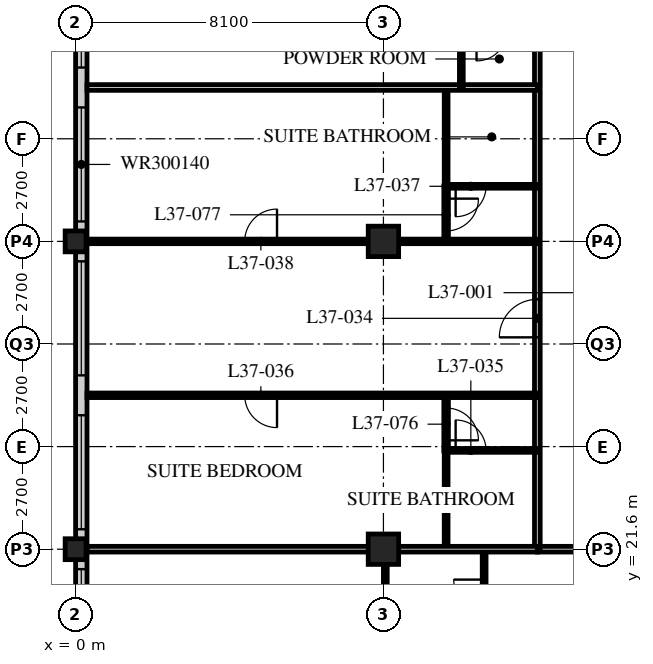
"""IFC4 building model, lengths in metres.
Left out: names, types, materials, properties, quantities, classifications, styles, units other than length and angle.
Written with IfcOpenShell. Run it as: python <this file> out.ifc"""

import sys

from ifc_helpers import new_model, si_unit, direction, frame, frame_2d, origin, origin_2d, place, context, subcontext, project, spatial, rectangle, hollow_rectangle, extrude, element, fill, save


model = new_model("IFC4")
c1 = context("Model", 3, precision=1e-05, world=origin(), true_north=direction((0.0, 1.0)))
c2 = subcontext(c1, "Body", "Model", "MODEL_VIEW")
j1 = project(units=[si_unit("LENGTHUNIT", "METRE"), si_unit("PLANEANGLEUNIT", "RADIAN")], contexts=[c1])
p1 = place(None, origin())
s1 = spatial("IfcSite", under=j1, at=p1, CompositionType="ELEMENT")
p2 = place(p1, origin())
s2 = spatial("IfcBuilding", under=s1, at=p2, CompositionType="ELEMENT")
p3 = place(p2, frame((0.0, 0.0, 144.2)))
s3 = spatial("IfcBuildingStorey", under=s2, at=p3, CompositionType="ELEMENT", Elevation=144.2)
for number, where, z_axis, x_axis in (
    (1, (0.0, 21.6, 0.0), (0.0, 0.0, 1.0), (1.0, 0.0, 0.0)),
    (2, (0.0, 29.7, 0.0), (0.0, 0.0, 1.0), (1.0, 0.0, 0.0)),
):
    element("IfcColumn", number, at=place(p3, frame(where, z_axis=z_axis, x_axis=x_axis)), inside=s3, PredefinedType="COLUMN", context=c2, shape_type="SweptSolid", body=[
        extrude(hollow_rectangle(XDim=0.55, YDim=0.55, WallThickness=0.04, at=origin_2d()), origin(), (0.0, 0.0, 1.0), 3.4),
    ])
for number, where, z_axis, x_axis in (
    (3, (8.1, 21.6, 0.0), (0.0, 0.0, 1.0), (1.0, 0.0, 0.0)),
    (4, (8.1, 29.7, 0.0), (0.0, 0.0, 1.0), (1.0, 0.0, 0.0)),
):
    element("IfcColumn", number, at=place(p3, frame(where, z_axis=z_axis, x_axis=x_axis)), inside=s3, PredefinedType="COLUMN", context=c2, shape_type="SweptSolid", body=[
        extrude(hollow_rectangle(XDim=0.8, YDim=0.8, WallThickness=0.08, at=origin_2d()), origin(), (0.0, 0.0, 1.0), 3.4),
    ])
p4 = place(p3, frame((0.15, 45.6, 0.0), z_axis=(0.0, 0.0, 1.0), x_axis=(0.0, -1.0, 0.0)))
e5 = element("IfcWall", 5, at=p4, inside=s3, PredefinedType="SOLIDWALL", context=c2, shape_type="SweptSolid", body=[
    extrude(rectangle(XDim=32.1, YDim=0.3, at=frame_2d((16.05, 0.0))), origin(), (0.0, 0.0, 1.0), 3.19),
])
p5 = place(p4, frame((0.225, 0.0, 0.9)))
e6 = element("IfcOpeningElement", 6, at=p5, cuts=e5, PredefinedType="OPENING", context=c2, shape_type="SweptSolid", body=[
    extrude(rectangle(XDim=3.0, YDim=1.4, at=frame_2d((1.5, 0.7))), frame((0.0, 0.16, 0.0), z_axis=(0.0, -1.0, 0.0), x_axis=(1.0, 0.0, 0.0)), (0.0, 0.0, 1.0), 0.32),
])
p6 = place(p4, frame((4.275, 0.0, 0.9)))
e7 = element("IfcOpeningElement", 7, at=p6, cuts=e5, PredefinedType="OPENING", context=c2, shape_type="SweptSolid", body=[
    extrude(rectangle(XDim=3.0, YDim=1.4, at=frame_2d((1.5, 0.7))), frame((0.0, 0.16, 0.0), z_axis=(0.0, -1.0, 0.0), x_axis=(1.0, 0.0, 0.0)), (0.0, 0.0, 1.0), 0.32),
])
p7 = place(p4, frame((8.325, 0.0, 0.9)))
e8 = element("IfcOpeningElement", 8, at=p7, cuts=e5, PredefinedType="OPENING", context=c2, shape_type="SweptSolid", body=[
    extrude(rectangle(XDim=3.0, YDim=1.4, at=frame_2d((1.5, 0.7))), frame((0.0, 0.16, 0.0), z_axis=(0.0, -1.0, 0.0), x_axis=(1.0, 0.0, 0.0)), (0.0, 0.0, 1.0), 0.32),
])
p8 = place(p4, frame((12.375, 0.0, 0.9)))
e9 = element("IfcOpeningElement", 9, at=p8, cuts=e5, PredefinedType="OPENING", context=c2, shape_type="SweptSolid", body=[
    extrude(rectangle(XDim=3.0, YDim=1.4, at=frame_2d((1.5, 0.7))), frame((0.0, 0.16, 0.0), z_axis=(0.0, -1.0, 0.0), x_axis=(1.0, 0.0, 0.0)), (0.0, 0.0, 1.0), 0.32),
])
p9 = place(p4, frame((16.425, 0.0, 0.9)))
e10 = element("IfcOpeningElement", 10, at=p9, cuts=e5, PredefinedType="OPENING", context=c2, shape_type="SweptSolid", body=[
    extrude(rectangle(XDim=3.0, YDim=1.4, at=frame_2d((1.5, 0.7))), frame((0.0, 0.16, 0.0), z_axis=(0.0, -1.0, 0.0), x_axis=(1.0, 0.0, 0.0)), (0.0, 0.0, 1.0), 0.32),
])
p10 = place(p4, frame((20.475, 0.0, 0.9)))
e11 = element("IfcOpeningElement", 11, at=p10, cuts=e5, PredefinedType="OPENING", context=c2, shape_type="SweptSolid", body=[
    extrude(rectangle(XDim=3.0, YDim=1.4, at=frame_2d((1.5, 0.7))), frame((0.0, 0.16, 0.0), z_axis=(0.0, -1.0, 0.0), x_axis=(1.0, 0.0, 0.0)), (0.0, 0.0, 1.0), 0.32),
])
p11 = place(p4, frame((24.525, 0.0, 0.9)))
e12 = element("IfcOpeningElement", 12, at=p11, cuts=e5, PredefinedType="OPENING", context=c2, shape_type="SweptSolid", body=[
    extrude(rectangle(XDim=3.0, YDim=1.4, at=frame_2d((1.5, 0.7))), frame((0.0, 0.16, 0.0), z_axis=(0.0, -1.0, 0.0), x_axis=(1.0, 0.0, 0.0)), (0.0, 0.0, 1.0), 0.32),
])
p12 = place(p4, frame((28.575, 0.0, 0.9)))
e13 = element("IfcOpeningElement", 13, at=p12, cuts=e5, PredefinedType="OPENING", context=c2, shape_type="SweptSolid", body=[
    extrude(rectangle(XDim=3.0, YDim=1.4, at=frame_2d((1.5, 0.7))), frame((0.0, 0.16, 0.0), z_axis=(0.0, -1.0, 0.0), x_axis=(1.0, 0.0, 0.0)), (0.0, 0.0, 1.0), 0.32),
])
p13 = place(p3, frame((12.15, 21.6, 0.0), z_axis=(0.0, 0.0, 1.0), x_axis=(1.0, 0.0, 0.0)))
e14 = element("IfcWall", 14, at=p13, inside=s3, PredefinedType="PARTITIONING", context=c2, shape_type="SweptSolid", body=[
    extrude(rectangle(XDim=36.45, YDim=0.15, at=frame_2d((18.225, 0.0))), origin(), (0.0, 0.0, 1.0), 2.42),
])
p14 = place(p13, frame((5.95, 0.0, 0.0)))
e15 = element("IfcOpeningElement", 15, at=p14, cuts=e14, PredefinedType="OPENING", context=c2, shape_type="SweptSolid", body=[
    extrude(rectangle(XDim=1.0, YDim=2.1, at=frame_2d((0.5, 1.05))), frame((0.0, 0.085, 0.0), z_axis=(0.0, -1.0, 0.0), x_axis=(1.0, 0.0, 0.0)), (0.0, 0.0, 1.0), 0.17),
])
p15 = place(p13, frame((14.05, 0.0, 0.0)))
e16 = element("IfcOpeningElement", 16, at=p15, cuts=e14, PredefinedType="OPENING", context=c2, shape_type="SweptSolid", body=[
    extrude(rectangle(XDim=1.0, YDim=2.1, at=frame_2d((0.5, 1.05))), frame((0.0, 0.085, 0.0), z_axis=(0.0, -1.0, 0.0), x_axis=(1.0, 0.0, 0.0)), (0.0, 0.0, 1.0), 0.17),
])
p16 = place(p13, frame((22.15, 0.0, 0.0)))
e17 = element("IfcOpeningElement", 17, at=p16, cuts=e14, PredefinedType="OPENING", context=c2, shape_type="SweptSolid", body=[
    extrude(rectangle(XDim=1.0, YDim=2.1, at=frame_2d((0.5, 1.05))), frame((0.0, 0.085, 0.0), z_axis=(0.0, -1.0, 0.0), x_axis=(1.0, 0.0, 0.0)), (0.0, 0.0, 1.0), 0.17),
])
p17 = place(p13, frame((30.8, 0.0, 0.0)))
e18 = element("IfcOpeningElement", 18, at=p17, cuts=e14, PredefinedType="OPENING", context=c2, shape_type="SweptSolid", body=[
    extrude(rectangle(XDim=1.0, YDim=2.1, at=frame_2d((0.5, 1.05))), frame((0.0, 0.085, 0.0), z_axis=(0.0, -1.0, 0.0), x_axis=(1.0, 0.0, 0.0)), (0.0, 0.0, 1.0), 0.17),
])
p18 = place(p13, frame((1.525, 0.0, 0.0)))
e19 = element("IfcOpeningElement", 19, at=p18, cuts=e14, PredefinedType="OPENING", context=c2, shape_type="SweptSolid", body=[
    extrude(rectangle(XDim=1.0, YDim=2.1, at=frame_2d((0.5, 1.05))), frame((0.0, 0.085, 0.0), z_axis=(0.0, -1.0, 0.0), x_axis=(1.0, 0.0, 0.0)), (0.0, 0.0, 1.0), 0.17),
])
p19 = place(p13, frame((33.925, 0.0, 0.0)))
e20 = element("IfcOpeningElement", 20, at=p19, cuts=e14, PredefinedType="OPENING", context=c2, shape_type="SweptSolid", body=[
    extrude(rectangle(XDim=1.0, YDim=2.1, at=frame_2d((0.5, 1.05))), frame((0.0, 0.085, 0.0), z_axis=(0.0, -1.0, 0.0), x_axis=(1.0, 0.0, 0.0)), (0.0, 0.0, 1.0), 0.17),
])
p20 = place(p3, frame((12.15, 21.6, 0.0), z_axis=(0.0, 0.0, 1.0), x_axis=(0.0, 1.0, 0.0)))
e21 = element("IfcWall", 21, at=p20, inside=s3, PredefinedType="PARTITIONING", context=c2, shape_type="SweptSolid", body=[
    extrude(rectangle(XDim=24.3, YDim=0.15, at=frame_2d((12.15, 0.0))), origin(), (0.0, 0.0, 1.0), 3.19),
])
p21 = place(p20, frame((5.575, 0.0, 0.0)))
e22 = element("IfcOpeningElement", 22, at=p21, cuts=e21, PredefinedType="OPENING", context=c2, shape_type="SweptSolid", body=[
    extrude(rectangle(XDim=1.0, YDim=2.1, at=frame_2d((0.5, 1.05))), frame((0.0, 0.085, 0.0), z_axis=(0.0, -1.0, 0.0), x_axis=(1.0, 0.0, 0.0)), (0.0, 0.0, 1.0), 0.17),
])
p22 = place(p20, frame((14.05, 0.0, 0.0)))
e23 = element("IfcOpeningElement", 23, at=p22, cuts=e21, PredefinedType="OPENING", context=c2, shape_type="SweptSolid", body=[
    extrude(rectangle(XDim=1.0, YDim=2.1, at=frame_2d((0.5, 1.05))), frame((0.0, 0.085, 0.0), z_axis=(0.0, -1.0, 0.0), x_axis=(1.0, 0.0, 0.0)), (0.0, 0.0, 1.0), 0.17),
])
p23 = place(p20, frame((22.7, 0.0, 0.0)))
e24 = element("IfcOpeningElement", 24, at=p23, cuts=e21, PredefinedType="OPENING", context=c2, shape_type="SweptSolid", body=[
    extrude(rectangle(XDim=1.0, YDim=2.1, at=frame_2d((0.5, 1.05))), frame((0.0, 0.085, 0.0), z_axis=(0.0, -1.0, 0.0), x_axis=(1.0, 0.0, 0.0)), (0.0, 0.0, 1.0), 0.17),
])
p24 = place(p3, frame((9.75, 21.6, 0.0), z_axis=(0.0, 0.0, 1.0), x_axis=(0.0, 1.0, 0.0)))
e25 = element("IfcWall", 25, at=p24, inside=s3, PredefinedType="PARTITIONING", context=c2, shape_type="SweptSolid", body=[
    extrude(rectangle(XDim=2.6, YDim=0.1, at=frame_2d((1.3, 0.0))), origin(), (0.0, 0.0, 1.0), 3.19),
])
p25 = place(p3, frame((12.15, 24.2, 0.0), z_axis=(0.0, 0.0, 1.0), x_axis=(-1.0, 0.0, 0.0)))
e26 = element("IfcWall", 26, at=p25, inside=s3, PredefinedType="PARTITIONING", context=c2, shape_type="SweptSolid", body=[
    extrude(rectangle(XDim=2.4, YDim=0.1, at=frame_2d((1.2, 0.0))), origin(), (0.0, 0.0, 1.0), 3.19),
])
p26 = place(p25, frame((1.35, 0.0, 0.0)))
e27 = element("IfcOpeningElement", 27, at=p26, cuts=e26, PredefinedType="OPENING", context=c2, shape_type="SweptSolid", body=[
    extrude(rectangle(XDim=0.8, YDim=2.1, at=frame_2d((0.4, 1.05))), frame((0.0, 0.06, 0.0), z_axis=(0.0, -1.0, 0.0), x_axis=(1.0, 0.0, 0.0)), (0.0, 0.0, 1.0), 0.12),
])
p27 = place(p3, frame((12.15, 25.65, 0.0), z_axis=(0.0, 0.0, 1.0), x_axis=(-1.0, 0.0, 0.0)))
e28 = element("IfcWall", 28, at=p27, inside=s3, PredefinedType="PARTITIONING", context=c2, shape_type="SweptSolid", body=[
    extrude(rectangle(XDim=11.85, YDim=0.12, at=frame_2d((5.925, 0.0))), origin(), (0.0, 0.0, 1.0), 3.19),
])
p28 = place(p27, frame((6.85, 0.0, 0.0)))
e29 = element("IfcOpeningElement", 29, at=p28, cuts=e28, PredefinedType="OPENING", context=c2, shape_type="SweptSolid", body=[
    extrude(rectangle(XDim=0.85, YDim=2.1, at=frame_2d((0.425, 1.05))), frame((0.0, 0.07, 0.0), z_axis=(0.0, -1.0, 0.0), x_axis=(1.0, 0.0, 0.0)), (0.0, 0.0, 1.0), 0.14),
])
p29 = place(p3, frame((9.75, 31.15, 0.0), z_axis=(0.0, 0.0, 1.0), x_axis=(0.0, 1.0, 0.0)))
e30 = element("IfcWall", 30, at=p29, inside=s3, PredefinedType="PARTITIONING", context=c2, shape_type="SweptSolid", body=[
    extrude(rectangle(XDim=2.6, YDim=0.1, at=frame_2d((1.3, 0.0))), origin(), (0.0, 0.0, 1.0), 3.19),
])
p30 = place(p3, frame((12.15, 31.15, 0.0), z_axis=(0.0, 0.0, 1.0), x_axis=(-1.0, 0.0, 0.0)))
e31 = element("IfcWall", 31, at=p30, inside=s3, PredefinedType="PARTITIONING", context=c2, shape_type="SweptSolid", body=[
    extrude(rectangle(XDim=2.4, YDim=0.1, at=frame_2d((1.2, 0.0))), origin(), (0.0, 0.0, 1.0), 3.19),
])
p31 = place(p30, frame((1.35, 0.0, 0.0)))
e32 = element("IfcOpeningElement", 32, at=p31, cuts=e31, PredefinedType="OPENING", context=c2, shape_type="SweptSolid", body=[
    extrude(rectangle(XDim=0.8, YDim=2.1, at=frame_2d((0.4, 1.05))), frame((0.0, 0.06, 0.0), z_axis=(0.0, -1.0, 0.0), x_axis=(1.0, 0.0, 0.0)), (0.0, 0.0, 1.0), 0.12),
])
p32 = place(p3, frame((12.15, 29.7, 0.0), z_axis=(0.0, 0.0, 1.0), x_axis=(-1.0, 0.0, 0.0)))
e33 = element("IfcWall", 33, at=p32, inside=s3, PredefinedType="PARTITIONING", context=c2, shape_type="SweptSolid", body=[
    extrude(rectangle(XDim=11.85, YDim=0.12, at=frame_2d((5.925, 0.0))), origin(), (0.0, 0.0, 1.0), 2.42),
])
p33 = place(p32, frame((6.85, 0.0, 0.0)))
e34 = element("IfcOpeningElement", 34, at=p33, cuts=e33, PredefinedType="OPENING", context=c2, shape_type="SweptSolid", body=[
    extrude(rectangle(XDim=0.85, YDim=2.1, at=frame_2d((0.425, 1.05))), frame((0.0, 0.07, 0.0), z_axis=(0.0, -1.0, 0.0), x_axis=(1.0, 0.0, 0.0)), (0.0, 0.0, 1.0), 0.14),
])
p34 = place(p3, frame((12.15, 33.75, 0.0), z_axis=(0.0, 0.0, 1.0), x_axis=(-1.0, 0.0, 0.0)))
e35 = element("IfcWall", 35, at=p34, inside=s3, PredefinedType="PARTITIONING", context=c2, shape_type="SweptSolid", body=[
    extrude(rectangle(XDim=11.85, YDim=0.15, at=frame_2d((5.925, 0.0))), origin(), (0.0, 0.0, 1.0), 3.19),
])
p35 = place(p3, frame((10.15, 33.75, 0.0), z_axis=(0.0, 0.0, 1.0), x_axis=(0.0, 1.0, 0.0)))
e36 = element("IfcWall", 36, at=p35, inside=s3, PredefinedType="PARTITIONING", context=c2, shape_type="SweptSolid", body=[
    extrude(rectangle(XDim=1.5, YDim=0.1, at=frame_2d((0.75, 0.0))), origin(), (0.0, 0.0, 1.0), 3.19),
])
p36 = place(p3, frame((10.75, 21.6, 0.0), z_axis=(0.0, 0.0, 1.0), x_axis=(0.0, -1.0, 0.0)))
e37 = element("IfcWall", 37, at=p36, inside=s3, PredefinedType="PARTITIONING", context=c2, shape_type="SweptSolid", body=[
    extrude(rectangle(XDim=2.4, YDim=0.1, at=frame_2d((1.2, 0.0))), origin(), (0.0, 0.0, 1.0), 3.19),
])
p37 = place(p36, frame((0.8, 0.0, 0.0)))
e38 = element("IfcOpeningElement", 38, at=p37, cuts=e37, PredefinedType="OPENING", context=c2, shape_type="SweptSolid", body=[
    extrude(rectangle(XDim=0.8, YDim=2.1, at=frame_2d((0.4, 1.05))), frame((0.0, 0.06, 0.0), z_axis=(0.0, -1.0, 0.0), x_axis=(1.0, 0.0, 0.0)), (0.0, 0.0, 1.0), 0.12),
])
p38 = place(p3, frame((8.15, 21.6, 0.0), z_axis=(0.0, 0.0, 1.0), x_axis=(0.0, -1.0, 0.0)))
e39 = element("IfcWall", 39, at=p38, inside=s3, PredefinedType="PARTITIONING", context=c2, shape_type="SweptSolid", body=[
    extrude(rectangle(XDim=2.4, YDim=0.1, at=frame_2d((1.2, 0.0))), origin(), (0.0, 0.0, 1.0), 2.42),
])
p39 = place(p3, frame((0.3, 21.6, 0.0), z_axis=(0.0, 0.0, 1.0), x_axis=(1.0, 0.0, 0.0)))
e40 = element("IfcWall", 40, at=p39, inside=s3, PredefinedType="PARTITIONING", context=c2, shape_type="SweptSolid", body=[
    extrude(rectangle(XDim=11.85, YDim=0.15, at=frame_2d((5.925, 0.0))), origin(), (0.0, 0.0, 1.0), 2.42),
])
p40 = place(p3, frame((9.75, 24.19, 0.0), z_axis=(0.0, 0.0, 1.0), x_axis=(0.0, 1.0, 0.0)))
e41 = element("IfcWall", 41, at=p40, inside=s3, PredefinedType="PARTITIONING", context=c2, shape_type="SweptSolid", body=[
    extrude(rectangle(XDim=1.46, YDim=0.12, at=frame_2d((0.73, 0.0))), origin(), (0.0, 0.0, 1.0), 3.19),
])
p41 = place(p40, frame((0.275, 0.0, 0.0)))
e42 = element("IfcOpeningElement", 42, at=p41, cuts=e41, PredefinedType="OPENING", context=c2, shape_type="SweptSolid", body=[
    extrude(rectangle(XDim=0.85, YDim=2.1, at=frame_2d((0.425, 1.05))), frame((0.0, 0.07, 0.0), z_axis=(0.0, -1.0, 0.0), x_axis=(1.0, 0.0, 0.0)), (0.0, 0.0, 1.0), 0.14),
])
p42 = place(p3, frame((9.75, 29.7, 0.0), z_axis=(0.0, 0.0, 1.0), x_axis=(0.0, 1.0, 0.0)))
e43 = element("IfcWall", 43, at=p42, inside=s3, PredefinedType="PARTITIONING", context=c2, shape_type="SweptSolid", body=[
    extrude(rectangle(XDim=1.46, YDim=0.12, at=frame_2d((0.73, 0.0))), origin(), (0.0, 0.0, 1.0), 3.19),
])
p43 = place(p42, frame((0.275, 0.0, 0.0)))
e44 = element("IfcOpeningElement", 44, at=p43, cuts=e43, PredefinedType="OPENING", context=c2, shape_type="SweptSolid", body=[
    extrude(rectangle(XDim=0.85, YDim=2.1, at=frame_2d((0.425, 1.05))), frame((0.0, 0.07, 0.0), z_axis=(0.0, -1.0, 0.0), x_axis=(1.0, 0.0, 0.0)), (0.0, 0.0, 1.0), 0.14),
])
p44 = place(p7, origin())
e45 = element("IfcWindow", 45, at=p44, inside=s3, PartitioningType="SINGLE_PANEL", PredefinedType="WINDOW", context=c2, shape_type="SweptSolid", body=[
    extrude(rectangle(XDim=3.0, YDim=1.4, at=frame_2d((1.5, 0.7))), frame((0.0, 0.03, 0.0), z_axis=(0.0, -1.0, 0.0), x_axis=(1.0, 0.0, 0.0)), (0.0, 0.0, 1.0), 0.06),
])
fill(e8, e45)
p45 = place(p8, origin())
e46 = element("IfcWindow", 46, at=p45, inside=s3, PartitioningType="SINGLE_PANEL", PredefinedType="WINDOW", context=c2, shape_type="SweptSolid", body=[
    extrude(rectangle(XDim=3.0, YDim=1.4, at=frame_2d((1.5, 0.7))), frame((0.0, 0.03, 0.0), z_axis=(0.0, -1.0, 0.0), x_axis=(1.0, 0.0, 0.0)), (0.0, 0.0, 1.0), 0.06),
])
fill(e9, e46)
p46 = place(p9, origin())
e47 = element("IfcWindow", 47, at=p46, inside=s3, PartitioningType="SINGLE_PANEL", PredefinedType="WINDOW", context=c2, shape_type="SweptSolid", body=[
    extrude(rectangle(XDim=3.0, YDim=1.4, at=frame_2d((1.5, 0.7))), frame((0.0, 0.03, 0.0), z_axis=(0.0, -1.0, 0.0), x_axis=(1.0, 0.0, 0.0)), (0.0, 0.0, 1.0), 0.06),
])
fill(e10, e47)
p47 = place(p10, origin())
e48 = element("IfcWindow", 48, at=p47, inside=s3, PartitioningType="SINGLE_PANEL", PredefinedType="WINDOW", context=c2, shape_type="SweptSolid", body=[
    extrude(rectangle(XDim=3.0, YDim=1.4, at=frame_2d((1.5, 0.7))), frame((0.0, 0.03, 0.0), z_axis=(0.0, -1.0, 0.0), x_axis=(1.0, 0.0, 0.0)), (0.0, 0.0, 1.0), 0.06),
])
fill(e11, e48)
p48 = place(p11, origin())
e49 = element("IfcWindow", 49, at=p48, inside=s3, PartitioningType="SINGLE_PANEL", PredefinedType="WINDOW", context=c2, shape_type="SweptSolid", body=[
    extrude(rectangle(XDim=3.0, YDim=1.4, at=frame_2d((1.5, 0.7))), frame((0.0, 0.03, 0.0), z_axis=(0.0, -1.0, 0.0), x_axis=(1.0, 0.0, 0.0)), (0.0, 0.0, 1.0), 0.06),
])
fill(e12, e49)
p49 = place(p21, origin())
e50 = element("IfcDoor", 50, at=p49, inside=s3, OperationType="SINGLE_SWING_LEFT", PredefinedType="DOOR", context=c2, shape_type="SweptSolid", body=[
    extrude(rectangle(XDim=1.0, YDim=2.1, at=frame_2d((0.5, 1.05))), frame((0.0, 0.025, 0.0), z_axis=(0.0, -1.0, 0.0), x_axis=(1.0, 0.0, 0.0)), (0.0, 0.0, 1.0), 0.05),
])
fill(e22, e50)
p50 = place(p26, origin())
e51 = element("IfcDoor", 51, at=p50, inside=s3, OperationType="SINGLE_SWING_LEFT", PredefinedType="DOOR", context=c2, shape_type="SweptSolid", body=[
    extrude(rectangle(XDim=0.8, YDim=2.1, at=frame_2d((0.4, 1.05))), frame((0.0, 0.025, 0.0), z_axis=(0.0, -1.0, 0.0), x_axis=(1.0, 0.0, 0.0)), (0.0, 0.0, 1.0), 0.05),
])
fill(e27, e51)
p51 = place(p28, origin())
e52 = element("IfcDoor", 52, at=p51, inside=s3, OperationType="SINGLE_SWING_LEFT", PredefinedType="DOOR", context=c2, shape_type="SweptSolid", body=[
    extrude(rectangle(XDim=0.85, YDim=2.1, at=frame_2d((0.425, 1.05))), frame((0.0, 0.025, 0.0), z_axis=(0.0, -1.0, 0.0), x_axis=(1.0, 0.0, 0.0)), (0.0, 0.0, 1.0), 0.05),
])
fill(e29, e52)
p52 = place(p31, origin())
e53 = element("IfcDoor", 53, at=p52, inside=s3, OperationType="SINGLE_SWING_RIGHT", PredefinedType="DOOR", context=c2, shape_type="SweptSolid", body=[
    extrude(rectangle(XDim=0.8, YDim=2.1, at=frame_2d((0.4, 1.05))), frame((0.0, 0.025, 0.0), z_axis=(0.0, -1.0, 0.0), x_axis=(1.0, 0.0, 0.0)), (0.0, 0.0, 1.0), 0.05),
])
fill(e32, e53)
p53 = place(p33, origin())
e54 = element("IfcDoor", 54, at=p53, inside=s3, OperationType="SINGLE_SWING_RIGHT", PredefinedType="DOOR", context=c2, shape_type="SweptSolid", body=[
    extrude(rectangle(XDim=0.85, YDim=2.1, at=frame_2d((0.425, 1.05))), frame((0.0, 0.025, 0.0), z_axis=(0.0, -1.0, 0.0), x_axis=(1.0, 0.0, 0.0)), (0.0, 0.0, 1.0), 0.05),
])
fill(e34, e54)
p54 = place(p37, origin())
e55 = element("IfcDoor", 55, at=p54, inside=s3, OperationType="SINGLE_SWING_RIGHT", PredefinedType="DOOR", context=c2, shape_type="SweptSolid", body=[
    extrude(rectangle(XDim=0.8, YDim=2.1, at=frame_2d((0.4, 1.05))), frame((0.0, 0.025, 0.0), z_axis=(0.0, -1.0, 0.0), x_axis=(1.0, 0.0, 0.0)), (0.0, 0.0, 1.0), 0.05),
])
fill(e38, e55)
p55 = place(p41, origin())
e56 = element("IfcDoor", 56, at=p55, inside=s3, OperationType="SINGLE_SWING_RIGHT", PredefinedType="DOOR", context=c2, shape_type="SweptSolid", body=[
    extrude(rectangle(XDim=0.85, YDim=2.1, at=frame_2d((0.425, 1.05))), frame((0.0, 0.025, 0.0), z_axis=(0.0, -1.0, 0.0), x_axis=(1.0, 0.0, 0.0)), (0.0, 0.0, 1.0), 0.05),
])
fill(e42, e56)
p56 = place(p43, origin())
e57 = element("IfcDoor", 57, at=p56, inside=s3, OperationType="SINGLE_SWING_LEFT", PredefinedType="DOOR", context=c2, shape_type="SweptSolid", body=[
    extrude(rectangle(XDim=0.85, YDim=2.1, at=frame_2d((0.425, 1.05))), frame((0.0, 0.025, 0.0), z_axis=(0.0, -1.0, 0.0), x_axis=(1.0, 0.0, 0.0)), (0.0, 0.0, 1.0), 0.05),
])
fill(e44, e57)
save(model, sys.argv[1])
